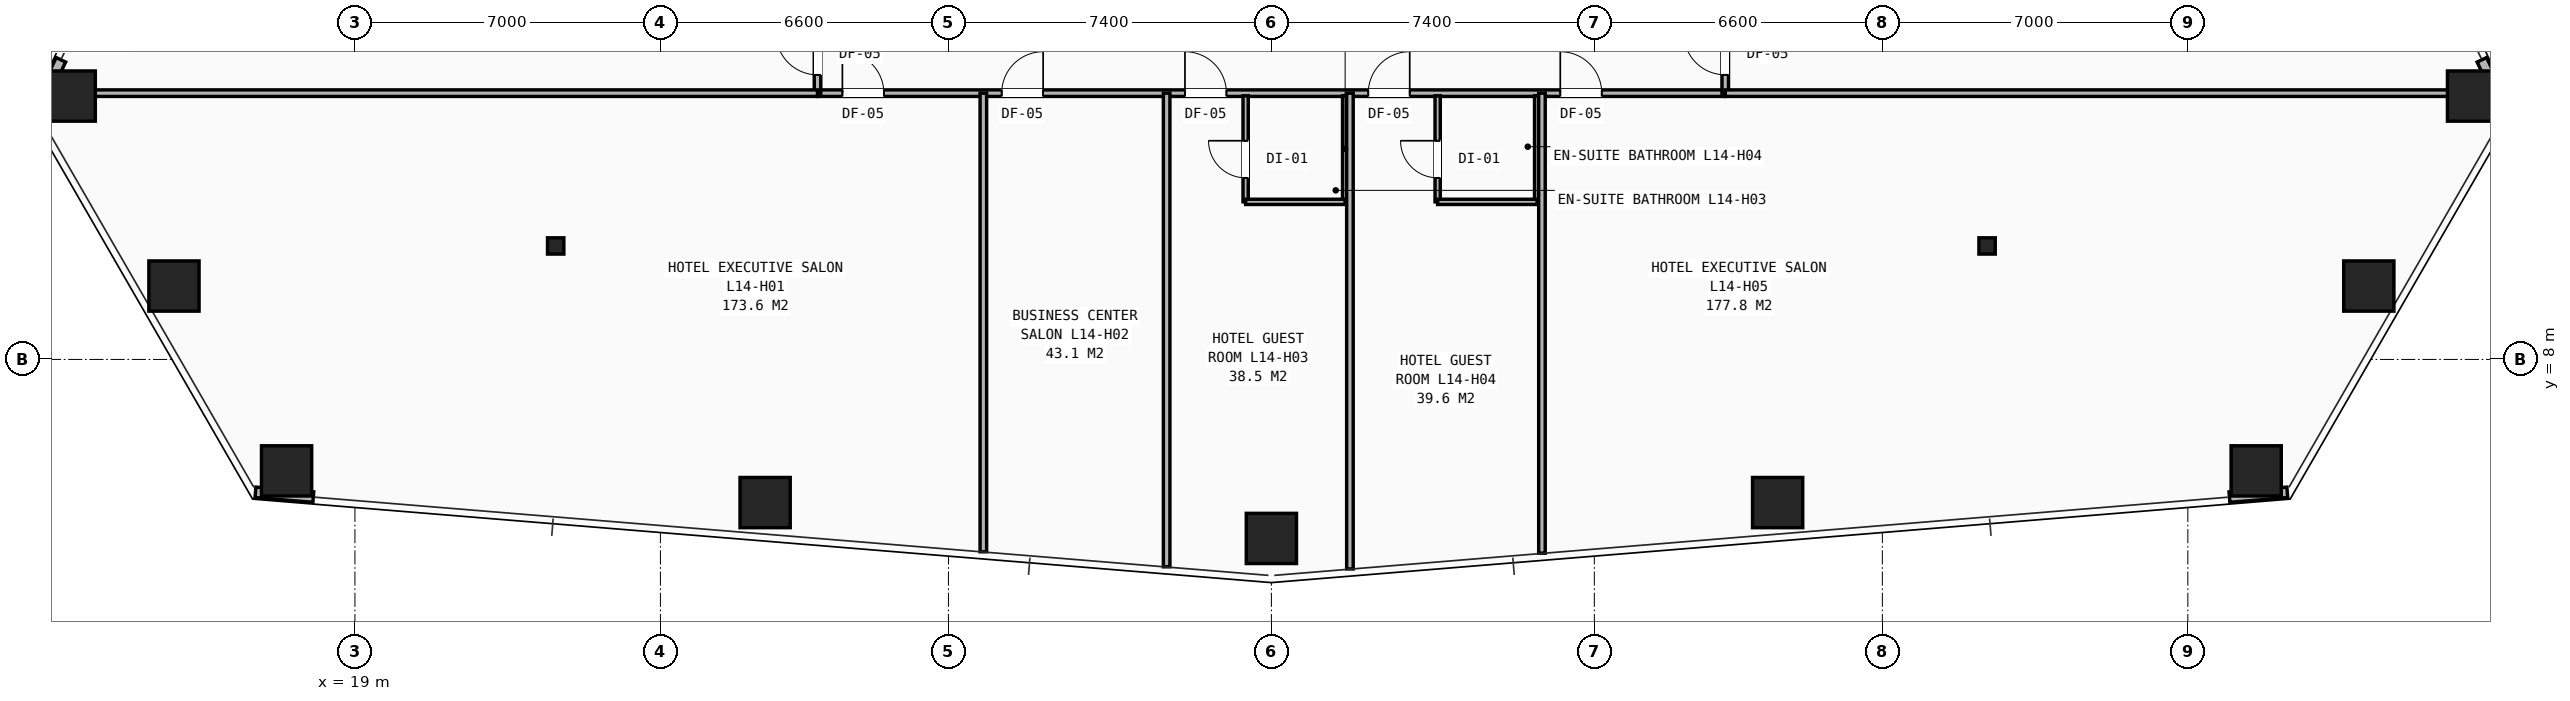
"""IFC4 building model, lengths in metres.
Left out: names, types, materials, properties, quantities, classifications, styles, units other than length and angle.
Written with IfcOpenShell. Run it as: python <this file> out.ifc"""

import sys

from ifc_helpers import new_model, si_unit, direction, frame, frame_2d, origin, origin_2d, place, context, subcontext, project, spatial, rectangle, hollow_rectangle, i_section, extrude, element, fill, save


model = new_model("IFC4")
c1 = context("Model", 3, precision=1e-05, world=origin(), true_north=direction((0.0, 1.0)))
c2 = subcontext(c1, "Body", "Model", "MODEL_VIEW")
j1 = project(units=[si_unit("LENGTHUNIT", "METRE"), si_unit("PLANEANGLEUNIT", "RADIAN")], contexts=[c1])
p1 = place(None, origin())
s1 = spatial("IfcSite", under=j1, at=p1, CompositionType="ELEMENT")
p2 = place(p1, origin())
s2 = spatial("IfcBuilding", under=s1, at=p2, CompositionType="ELEMENT")
p3 = place(p2, frame((0.0, 0.0, 52.8)))
s3 = spatial("IfcBuildingStorey", under=s2, at=p3, CompositionType="ELEMENT", Elevation=52.8)
for number, where, z_axis, x_axis in (
    (1, (23.6, 10.6, 0.0), (0.0, 0.0, 1.0), (1.0, 0.0, 0.0)),
    (2, (56.4, 10.6, 0.0), (0.0, 0.0, 1.0), (1.0, 0.0, 0.0)),
):
    element("IfcColumn", number, at=place(p3, frame(where, z_axis=z_axis, x_axis=x_axis)), inside=s3, PredefinedType="COLUMN", context=c2, shape_type="SweptSolid", body=[
        extrude(i_section(OverallWidth=0.374, OverallDepth=0.372, WebThickness=0.016, FlangeThickness=0.026, at=origin_2d()), origin(), (0.0, 0.0, 1.0), 3.2),
    ])
for number, where, z_axis, x_axis in (
    (3, (12.476, 14.033, 0.0), (0.0, 0.0, 1.0), (1.0, 0.0, 0.0)),
    (4, (14.853, 9.681, 0.0), (0.0, 0.0, 1.0), (1.0, 0.0, 0.0)),
    (5, (17.434, 5.447, 0.0), (0.0, 0.0, 1.0), (1.0, 0.0, 0.0)),
    (6, (28.399, 4.721, 0.0), (0.0, 0.0, 1.0), (1.0, 0.0, 0.0)),
    (7, (40.0, 3.899, 0.0), (0.0, 0.0, 1.0), (1.0, 0.0, 0.0)),
    (8, (51.601, 4.721, 0.0), (0.0, 0.0, 1.0), (1.0, 0.0, 0.0)),
    (9, (62.566, 5.447, 0.0), (0.0, 0.0, 1.0), (1.0, 0.0, 0.0)),
    (10, (65.147, 9.681, 0.0), (0.0, 0.0, 1.0), (1.0, 0.0, 0.0)),
    (11, (67.524, 14.033, 0.0), (0.0, 0.0, 1.0), (1.0, 0.0, 0.0)),
):
    element("IfcColumn", number, at=place(p3, frame(where, z_axis=z_axis, x_axis=x_axis)), inside=s3, PredefinedType="COLUMN", context=c2, shape_type="SweptSolid", body=[
        extrude(hollow_rectangle(XDim=1.15, YDim=1.15, WallThickness=0.075, at=origin_2d()), origin(), (0.0, 0.0, 1.0), 3.2),
    ])
p4 = place(p3, frame((12.263, 14.864, 0.0), z_axis=(0.0, 0.0, 1.0), x_axis=(-0.427644283084, -0.903947104175, 0.0)))
e12 = element("IfcWall", 12, at=p4, inside=s3, PredefinedType="SHEAR", context=c2, shape_type="SweptSolid", body=[
    extrude(rectangle(XDim=1.33, YDim=0.24, at=frame_2d((0.665, 0.0))), origin(), (0.0, 0.0, 1.0), 2.263),
])
for number, where, z_axis, x_axis in (
    (13, (16.721, 4.955, 0.0), (0.0, 0.0, 1.0), (0.997, -0.082, 0.0)),
    (14, (61.954, 4.847, 0.0), (0.0, 0.0, 1.0), (0.997, 0.082, 0.0)),
):
    element("IfcWall", number, at=place(p3, frame(where, z_axis=z_axis, x_axis=x_axis)), inside=s3, PredefinedType="SHEAR", context=c2, shape_type="SweptSolid", body=[
        extrude(rectangle(XDim=1.329, YDim=0.24, at=frame_2d((0.665, 0.0))), origin(), (0.0, 0.0, 1.0), 2.263),
    ])
p5 = place(p3, frame((68.306, 13.662, 0.0), z_axis=(0.0, 0.0, 1.0), x_axis=(-0.427644283084, 0.903947104175, 0.0)))
e15 = element("IfcWall", 15, at=p5, inside=s3, PredefinedType="SHEAR", context=c2, shape_type="SweptSolid", body=[
    extrude(rectangle(XDim=1.33, YDim=0.24, at=frame_2d((0.665, 0.0))), origin(), (0.0, 0.0, 1.0), 2.263),
])
p6 = place(p3, frame((29.6, 14.1, 0.0), z_axis=(0.0, 0.0, 1.0), x_axis=(1.0, 0.0, 0.0)))
e16 = element("IfcWall", 16, at=p6, inside=s3, PredefinedType="PARTITIONING", context=c2, shape_type="SweptSolid", body=[
    extrude(rectangle(XDim=20.8, YDim=0.15, at=frame_2d((10.4, 0.0))), origin(), (0.0, 0.0, 1.0), 2.191),
])
p7 = place(p6, frame((0.57, 0.0, 0.0)))
e17 = element("IfcOpeningElement", 17, at=p7, cuts=e16, PredefinedType="OPENING", context=c2, shape_type="SweptSolid", body=[
    extrude(rectangle(XDim=0.95, YDim=2.1, at=frame_2d((0.475, 1.05))), frame((0.0, 0.085, 0.0), z_axis=(0.0, -1.0, 0.0), x_axis=(1.0, 0.0, 0.0)), (0.0, 0.0, 1.0), 0.17),
])
p8 = place(p6, frame((4.22, 0.0, 0.0)))
e18 = element("IfcOpeningElement", 18, at=p8, cuts=e16, PredefinedType="OPENING", context=c2, shape_type="SweptSolid", body=[
    extrude(rectangle(XDim=0.95, YDim=2.1, at=frame_2d((0.475, 1.05))), frame((0.0, 0.085, 0.0), z_axis=(0.0, -1.0, 0.0), x_axis=(1.0, 0.0, 0.0)), (0.0, 0.0, 1.0), 0.17),
])
p9 = place(p6, frame((8.42, 0.0, 0.0)))
e19 = element("IfcOpeningElement", 19, at=p9, cuts=e16, PredefinedType="OPENING", context=c2, shape_type="SweptSolid", body=[
    extrude(rectangle(XDim=0.95, YDim=2.1, at=frame_2d((0.475, 1.05))), frame((0.0, 0.085, 0.0), z_axis=(0.0, -1.0, 0.0), x_axis=(1.0, 0.0, 0.0)), (0.0, 0.0, 1.0), 0.17),
])
p10 = place(p6, frame((12.62, 0.0, 0.0)))
e20 = element("IfcOpeningElement", 20, at=p10, cuts=e16, PredefinedType="OPENING", context=c2, shape_type="SweptSolid", body=[
    extrude(rectangle(XDim=0.95, YDim=2.1, at=frame_2d((0.475, 1.05))), frame((0.0, 0.085, 0.0), z_axis=(0.0, -1.0, 0.0), x_axis=(1.0, 0.0, 0.0)), (0.0, 0.0, 1.0), 0.17),
])
p11 = place(p6, frame((17.02, 0.0, 0.0)))
e21 = element("IfcOpeningElement", 21, at=p11, cuts=e16, PredefinedType="OPENING", context=c2, shape_type="SweptSolid", body=[
    extrude(rectangle(XDim=0.95, YDim=2.1, at=frame_2d((0.475, 1.05))), frame((0.0, 0.085, 0.0), z_axis=(0.0, -1.0, 0.0), x_axis=(1.0, 0.0, 0.0)), (0.0, 0.0, 1.0), 0.17),
])
p12 = place(p3, frame((29.6, 14.1, 0.0), z_axis=(0.0, 0.0, 1.0), x_axis=(0.0, 1.0, 0.0)))
e22 = element("IfcWall", 22, at=p12, inside=s3, PredefinedType="PARTITIONING", context=c2, shape_type="SweptSolid", body=[
    extrude(rectangle(XDim=21.9, YDim=0.15, at=frame_2d((10.95, 0.0))), origin(), (0.0, 0.0, 1.0), 2.191),
])
p13 = place(p12, frame((0.42, 0.0, 0.0)))
e23 = element("IfcOpeningElement", 23, at=p13, cuts=e22, PredefinedType="OPENING", context=c2, shape_type="SweptSolid", body=[
    extrude(rectangle(XDim=0.95, YDim=2.1, at=frame_2d((0.475, 1.05))), frame((0.0, 0.085, 0.0), z_axis=(0.0, -1.0, 0.0), x_axis=(1.0, 0.0, 0.0)), (0.0, 0.0, 1.0), 0.17),
])
p14 = place(p12, frame((5.12, 0.0, 0.0)))
e24 = element("IfcOpeningElement", 24, at=p14, cuts=e22, PredefinedType="OPENING", context=c2, shape_type="SweptSolid", body=[
    extrude(rectangle(XDim=0.95, YDim=2.1, at=frame_2d((0.475, 1.05))), frame((0.0, 0.085, 0.0), z_axis=(0.0, -1.0, 0.0), x_axis=(1.0, 0.0, 0.0)), (0.0, 0.0, 1.0), 0.17),
])
p15 = place(p12, frame((10.12, 0.0, 0.0)))
e25 = element("IfcOpeningElement", 25, at=p15, cuts=e22, PredefinedType="OPENING", context=c2, shape_type="SweptSolid", body=[
    extrude(rectangle(XDim=0.95, YDim=2.1, at=frame_2d((0.475, 1.05))), frame((0.0, 0.085, 0.0), z_axis=(0.0, -1.0, 0.0), x_axis=(1.0, 0.0, 0.0)), (0.0, 0.0, 1.0), 0.17),
])
p16 = place(p12, frame((16.12, 0.0, 0.0)))
e26 = element("IfcOpeningElement", 26, at=p16, cuts=e22, PredefinedType="OPENING", context=c2, shape_type="SweptSolid", body=[
    extrude(rectangle(XDim=0.95, YDim=2.1, at=frame_2d((0.475, 1.05))), frame((0.0, 0.085, 0.0), z_axis=(0.0, -1.0, 0.0), x_axis=(1.0, 0.0, 0.0)), (0.0, 0.0, 1.0), 0.17),
])
p17 = place(p3, frame((50.4, 14.1, 0.0), z_axis=(0.0, 0.0, 1.0), x_axis=(0.0, 1.0, 0.0)))
e27 = element("IfcWall", 27, at=p17, inside=s3, PredefinedType="PARTITIONING", context=c2, shape_type="SweptSolid", body=[
    extrude(rectangle(XDim=21.9, YDim=0.15, at=frame_2d((10.95, 0.0))), origin(), (0.0, 0.0, 1.0), 2.191),
])
p18 = place(p17, frame((0.42, 0.0, 0.0)))
e28 = element("IfcOpeningElement", 28, at=p18, cuts=e27, PredefinedType="OPENING", context=c2, shape_type="SweptSolid", body=[
    extrude(rectangle(XDim=0.95, YDim=2.1, at=frame_2d((0.475, 1.05))), frame((0.0, 0.085, 0.0), z_axis=(0.0, -1.0, 0.0), x_axis=(1.0, 0.0, 0.0)), (0.0, 0.0, 1.0), 0.17),
])
p19 = place(p17, frame((5.72, 0.0, 0.0)))
e29 = element("IfcOpeningElement", 29, at=p19, cuts=e27, PredefinedType="OPENING", context=c2, shape_type="SweptSolid", body=[
    extrude(rectangle(XDim=0.95, YDim=2.1, at=frame_2d((0.475, 1.05))), frame((0.0, 0.085, 0.0), z_axis=(0.0, -1.0, 0.0), x_axis=(1.0, 0.0, 0.0)), (0.0, 0.0, 1.0), 0.17),
])
p20 = place(p17, frame((11.12, 0.0, 0.0)))
e30 = element("IfcOpeningElement", 30, at=p20, cuts=e27, PredefinedType="OPENING", context=c2, shape_type="SweptSolid", body=[
    extrude(rectangle(XDim=0.95, YDim=2.1, at=frame_2d((0.475, 1.05))), frame((0.0, 0.085, 0.0), z_axis=(0.0, -1.0, 0.0), x_axis=(1.0, 0.0, 0.0)), (0.0, 0.0, 1.0), 0.17),
])
p21 = place(p17, frame((16.72, 0.0, 0.0)))
e31 = element("IfcOpeningElement", 31, at=p21, cuts=e27, PredefinedType="OPENING", context=c2, shape_type="SweptSolid", body=[
    extrude(rectangle(XDim=0.95, YDim=2.1, at=frame_2d((0.475, 1.05))), frame((0.0, 0.085, 0.0), z_axis=(0.0, -1.0, 0.0), x_axis=(1.0, 0.0, 0.0)), (0.0, 0.0, 1.0), 0.17),
])
p22 = place(p3, frame((33.4, 3.594, 0.0), z_axis=(0.0, 0.0, 1.0), x_axis=(0.0, 1.0, 0.0)))
e32 = element("IfcWall", 32, at=p22, inside=s3, PredefinedType="PARTITIONING", context=c2, shape_type="SweptSolid", body=[
    extrude(rectangle(XDim=10.507, YDim=0.15, at=frame_2d((5.253, 0.0))), origin(), (0.0, 0.0, 1.0), 2.191),
])
p23 = place(p3, frame((37.6, 3.25, 0.0), z_axis=(0.0, 0.0, 1.0), x_axis=(0.0, 1.0, 0.0)))
e33 = element("IfcWall", 33, at=p23, inside=s3, PredefinedType="PARTITIONING", context=c2, shape_type="SweptSolid", body=[
    extrude(rectangle(XDim=10.851, YDim=0.15, at=frame_2d((5.425, 0.0))), origin(), (0.0, 0.0, 1.0), 2.191),
])
p24 = place(p3, frame((39.41, 11.61, 0.0), z_axis=(0.0, 0.0, 1.0), x_axis=(0.0, 1.0, 0.0)))
e34 = element("IfcWall", 34, at=p24, inside=s3, PredefinedType="PARTITIONING", context=c2, shape_type="SweptSolid", body=[
    extrude(rectangle(XDim=2.43, YDim=0.12, at=frame_2d((1.215, 0.0))), origin(), (0.0, 0.0, 1.0), 2.98),
])
p25 = place(p24, frame((0.55, 0.0, 0.0)))
e35 = element("IfcOpeningElement", 35, at=p25, cuts=e34, PredefinedType="OPENING", context=c2, shape_type="SweptSolid", body=[
    extrude(rectangle(XDim=0.85, YDim=2.05, at=frame_2d((0.425, 1.025))), frame((0.0, 0.07, 0.0), z_axis=(0.0, -1.0, 0.0), x_axis=(1.0, 0.0, 0.0)), (0.0, 0.0, 1.0), 0.14),
])
p26 = place(p3, frame((41.69, 11.61, 0.0), z_axis=(0.0, 0.0, 1.0), x_axis=(0.0, 1.0, 0.0)))
e36 = element("IfcWall", 36, at=p26, inside=s3, PredefinedType="PARTITIONING", context=c2, shape_type="SweptSolid", body=[
    extrude(rectangle(XDim=2.43, YDim=0.12, at=frame_2d((1.215, 0.0))), origin(), (0.0, 0.0, 1.0), 2.98),
])
p27 = place(p3, frame((39.41, 11.61, 0.0), z_axis=(0.0, 0.0, 1.0), x_axis=(1.0, 0.0, 0.0)))
e37 = element("IfcWall", 37, at=p27, inside=s3, PredefinedType="PARTITIONING", context=c2, shape_type="SweptSolid", body=[
    extrude(rectangle(XDim=2.28, YDim=0.12, at=frame_2d((1.14, 0.0))), origin(), (0.0, 0.0, 1.0), 2.98),
])
p28 = place(p3, frame((41.8, 3.2, 0.0), z_axis=(0.0, 0.0, 1.0), x_axis=(0.0, 1.0, 0.0)))
e38 = element("IfcWall", 38, at=p28, inside=s3, PredefinedType="PARTITIONING", context=c2, shape_type="SweptSolid", body=[
    extrude(rectangle(XDim=10.9, YDim=0.15, at=frame_2d((5.45, 0.0))), origin(), (0.0, 0.0, 1.0), 2.268),
])
p29 = place(p3, frame((43.81, 11.61, 0.0), z_axis=(0.0, 0.0, 1.0), x_axis=(0.0, 1.0, 0.0)))
e39 = element("IfcWall", 39, at=p29, inside=s3, PredefinedType="PARTITIONING", context=c2, shape_type="SweptSolid", body=[
    extrude(rectangle(XDim=2.43, YDim=0.12, at=frame_2d((1.215, 0.0))), origin(), (0.0, 0.0, 1.0), 2.98),
])
p30 = place(p29, frame((0.55, 0.0, 0.0)))
e40 = element("IfcOpeningElement", 40, at=p30, cuts=e39, PredefinedType="OPENING", context=c2, shape_type="SweptSolid", body=[
    extrude(rectangle(XDim=0.85, YDim=2.05, at=frame_2d((0.425, 1.025))), frame((0.0, 0.07, 0.0), z_axis=(0.0, -1.0, 0.0), x_axis=(1.0, 0.0, 0.0)), (0.0, 0.0, 1.0), 0.14),
])
p31 = place(p3, frame((46.09, 11.61, 0.0), z_axis=(0.0, 0.0, 1.0), x_axis=(0.0, 1.0, 0.0)))
e41 = element("IfcWall", 41, at=p31, inside=s3, PredefinedType="PARTITIONING", context=c2, shape_type="SweptSolid", body=[
    extrude(rectangle(XDim=2.43, YDim=0.12, at=frame_2d((1.215, 0.0))), origin(), (0.0, 0.0, 1.0), 2.98),
])
p32 = place(p3, frame((43.81, 11.61, 0.0), z_axis=(0.0, 0.0, 1.0), x_axis=(1.0, 0.0, 0.0)))
e42 = element("IfcWall", 42, at=p32, inside=s3, PredefinedType="PARTITIONING", context=c2, shape_type="SweptSolid", body=[
    extrude(rectangle(XDim=2.28, YDim=0.12, at=frame_2d((1.14, 0.0))), origin(), (0.0, 0.0, 1.0), 2.98),
])
p33 = place(p3, frame((46.2, 3.561, 0.0), z_axis=(0.0, 0.0, 1.0), x_axis=(0.0, 1.0, 0.0)))
e43 = element("IfcWall", 43, at=p33, inside=s3, PredefinedType="PARTITIONING", context=c2, shape_type="SweptSolid", body=[
    extrude(rectangle(XDim=10.539, YDim=0.15, at=frame_2d((5.27, 0.0))), origin(), (0.0, 0.0, 1.0), 2.268),
])
for number, where, z_axis, x_axis in (
    (44, (11.906, 14.1, 0.0), (0.0, 0.0, 1.0), (1.0, 0.0, 0.0)),
    (45, (50.4, 14.1, 0.0), (0.0, 0.0, 1.0), (1.0, 0.0, 0.0)),
):
    element("IfcWall", number, at=place(p3, frame(where, z_axis=z_axis, x_axis=x_axis)), inside=s3, PredefinedType="PARTITIONING", context=c2, shape_type="SweptSolid", body=[
        extrude(rectangle(XDim=17.694, YDim=0.15, at=frame_2d((8.847, 0.0))), origin(), (0.0, 0.0, 1.0), 2.191),
    ])
p34 = place(p7, origin())
e46 = element("IfcDoor", 46, at=p34, inside=s3, OperationType="SINGLE_SWING_LEFT", PredefinedType="DOOR", context=c2, shape_type="SweptSolid", body=[
    extrude(rectangle(XDim=0.95, YDim=2.1, at=frame_2d((0.475, 1.05))), frame((0.0, 0.025, 0.0), z_axis=(0.0, -1.0, 0.0), x_axis=(1.0, 0.0, 0.0)), (0.0, 0.0, 1.0), 0.05),
])
fill(e17, e46)
p35 = place(p8, origin())
e47 = element("IfcDoor", 47, at=p35, inside=s3, OperationType="SINGLE_SWING_RIGHT", PredefinedType="DOOR", context=c2, shape_type="SweptSolid", body=[
    extrude(rectangle(XDim=0.95, YDim=2.1, at=frame_2d((0.475, 1.05))), frame((0.0, 0.025, 0.0), z_axis=(0.0, -1.0, 0.0), x_axis=(1.0, 0.0, 0.0)), (0.0, 0.0, 1.0), 0.05),
])
fill(e18, e47)
p36 = place(p9, origin())
e48 = element("IfcDoor", 48, at=p36, inside=s3, OperationType="SINGLE_SWING_LEFT", PredefinedType="DOOR", context=c2, shape_type="SweptSolid", body=[
    extrude(rectangle(XDim=0.95, YDim=2.1, at=frame_2d((0.475, 1.05))), frame((0.0, 0.025, 0.0), z_axis=(0.0, -1.0, 0.0), x_axis=(1.0, 0.0, 0.0)), (0.0, 0.0, 1.0), 0.05),
])
fill(e19, e48)
p37 = place(p25, origin())
e49 = element("IfcDoor", 49, at=p37, inside=s3, OperationType="SINGLE_SWING_RIGHT", PredefinedType="DOOR", context=c2, shape_type="SweptSolid", body=[
    extrude(rectangle(XDim=0.85, YDim=2.05, at=frame_2d((0.425, 1.025))), frame((0.0, 0.025, 0.0), z_axis=(0.0, -1.0, 0.0), x_axis=(1.0, 0.0, 0.0)), (0.0, 0.0, 1.0), 0.05),
])
fill(e35, e49)
p38 = place(p10, origin())
e50 = element("IfcDoor", 50, at=p38, inside=s3, OperationType="SINGLE_SWING_RIGHT", PredefinedType="DOOR", context=c2, shape_type="SweptSolid", body=[
    extrude(rectangle(XDim=0.95, YDim=2.1, at=frame_2d((0.475, 1.05))), frame((0.0, 0.025, 0.0), z_axis=(0.0, -1.0, 0.0), x_axis=(1.0, 0.0, 0.0)), (0.0, 0.0, 1.0), 0.05),
])
fill(e20, e50)
p39 = place(p30, origin())
e51 = element("IfcDoor", 51, at=p39, inside=s3, OperationType="SINGLE_SWING_RIGHT", PredefinedType="DOOR", context=c2, shape_type="SweptSolid", body=[
    extrude(rectangle(XDim=0.85, YDim=2.05, at=frame_2d((0.425, 1.025))), frame((0.0, 0.025, 0.0), z_axis=(0.0, -1.0, 0.0), x_axis=(1.0, 0.0, 0.0)), (0.0, 0.0, 1.0), 0.05),
])
fill(e40, e51)
p40 = place(p11, origin())
e52 = element("IfcDoor", 52, at=p40, inside=s3, OperationType="SINGLE_SWING_LEFT", PredefinedType="DOOR", context=c2, shape_type="SweptSolid", body=[
    extrude(rectangle(XDim=0.95, YDim=2.1, at=frame_2d((0.475, 1.05))), frame((0.0, 0.025, 0.0), z_axis=(0.0, -1.0, 0.0), x_axis=(1.0, 0.0, 0.0)), (0.0, 0.0, 1.0), 0.05),
])
fill(e21, e52)
p41 = place(p13, origin())
e53 = element("IfcDoor", 53, at=p41, inside=s3, OperationType="SINGLE_SWING_RIGHT", PredefinedType="DOOR", context=c2, shape_type="SweptSolid", body=[
    extrude(rectangle(XDim=0.95, YDim=2.1, at=frame_2d((0.475, 1.05))), frame((0.0, 0.025, 0.0), z_axis=(0.0, -1.0, 0.0), x_axis=(1.0, 0.0, 0.0)), (0.0, 0.0, 1.0), 0.05),
])
fill(e23, e53)
p42 = place(p18, origin())
e54 = element("IfcDoor", 54, at=p42, inside=s3, OperationType="SINGLE_SWING_RIGHT", PredefinedType="DOOR", context=c2, shape_type="SweptSolid", body=[
    extrude(rectangle(XDim=0.95, YDim=2.1, at=frame_2d((0.475, 1.05))), frame((0.0, 0.025, 0.0), z_axis=(0.0, -1.0, 0.0), x_axis=(1.0, 0.0, 0.0)), (0.0, 0.0, 1.0), 0.05),
])
fill(e28, e54)
save(model, sys.argv[1])
